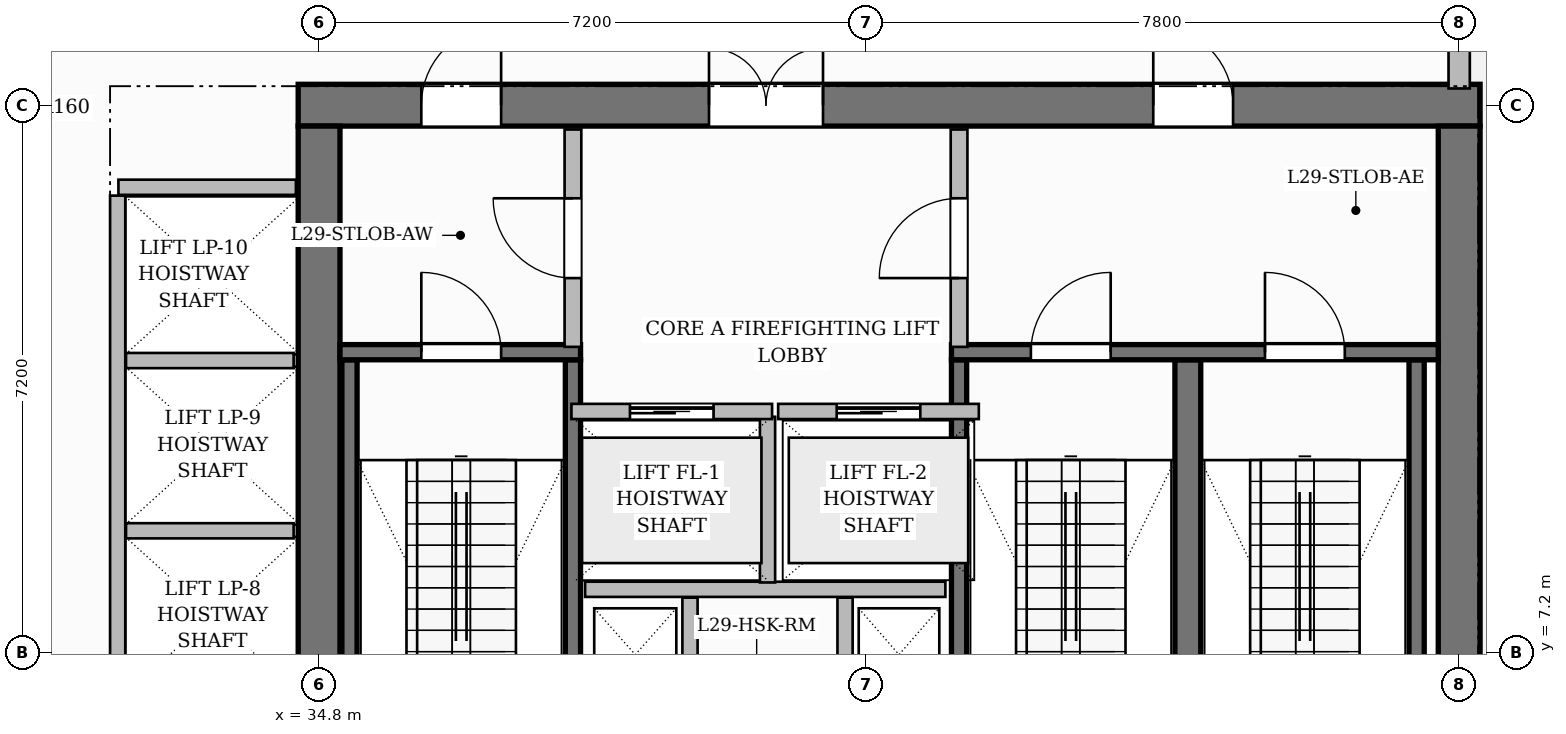
"""IFC4 building model, lengths in metres.
Left out: names, types, materials, properties, quantities, classifications, styles, units other than length and angle.
Written with IfcOpenShell. Run it as: python <this file> out.ifc"""

import sys

from ifc_helpers import new_model, si_unit, direction, frame, frame_2d, origin, place, context, subcontext, project, spatial, rectangle, extrude, source, transform, mapped, element, fill, save


model = new_model("IFC4")
c1 = context("Model", 3, precision=1e-05, world=origin(), true_north=direction((0.0, 1.0)))
c2 = subcontext(c1, "Body", "Model", "MODEL_VIEW")
j1 = project(units=[si_unit("LENGTHUNIT", "METRE"), si_unit("PLANEANGLEUNIT", "RADIAN")], contexts=[c1])
p1 = place(None, origin())
s1 = spatial("IfcSite", under=j1, at=p1, CompositionType="ELEMENT")
p2 = place(p1, origin())
s2 = spatial("IfcBuilding", under=s1, at=p2, CompositionType="ELEMENT")
p3 = place(p2, frame((0.0, 0.0, 119.2)))
s3 = spatial("IfcBuildingStorey", under=s2, at=p3, CompositionType="ELEMENT", Elevation=119.2)
p4 = place(p3, frame((34.525, 14.4, 0.0), z_axis=(0.0, 0.0, 1.0), x_axis=(1.0, 0.0, 0.0)))
e1 = element("IfcWall", 1, at=p4, inside=s3, PredefinedType="SHEAR", context=c2, shape_type="SweptSolid", body=[
    extrude(rectangle(XDim=15.55, YDim=0.55, at=frame_2d((7.775, 0.0))), origin(), (0.0, 0.0, 1.0), 3.7),
])
p5 = place(p4, frame((5.405, 0.0, 0.0)))
e2 = element("IfcOpeningElement", 2, at=p5, cuts=e1, PredefinedType="OPENING", context=c2, shape_type="SweptSolid", body=[
    extrude(rectangle(XDim=1.5, YDim=2.2, at=frame_2d((0.75, 1.1))), frame((0.0, 0.285, 0.0), z_axis=(0.0, -1.0, 0.0), x_axis=(1.0, 0.0, 0.0)), (0.0, 0.0, 1.0), 0.57),
])
p6 = place(p4, frame((1.62, 0.0, 0.0)))
e3 = element("IfcOpeningElement", 3, at=p6, cuts=e1, PredefinedType="OPENING", context=c2, shape_type="SweptSolid", body=[
    extrude(rectangle(XDim=1.05, YDim=2.15, at=frame_2d((0.525, 1.075))), frame((0.0, 0.285, 0.0), z_axis=(0.0, -1.0, 0.0), x_axis=(1.0, 0.0, 0.0)), (0.0, 0.0, 1.0), 0.57),
])
p7 = place(p4, frame((11.25, 0.0, 0.0)))
e4 = element("IfcOpeningElement", 4, at=p7, cuts=e1, PredefinedType="OPENING", context=c2, shape_type="SweptSolid", body=[
    extrude(rectangle(XDim=1.05, YDim=2.15, at=frame_2d((0.525, 1.075))), frame((0.0, 0.285, 0.0), z_axis=(0.0, -1.0, 0.0), x_axis=(1.0, 0.0, 0.0)), (0.0, 0.0, 1.0), 0.57),
])
for number, where, z_axis, x_axis in (
    (5, (34.8, 3.875, 0.0), (0.0, 0.0, 1.0), (0.0, 1.0, 0.0)),
    (6, (49.8, 3.875, 0.0), (0.0, 0.0, 1.0), (0.0, 1.0, 0.0)),
):
    element("IfcWall", number, at=place(p3, frame(where, z_axis=z_axis, x_axis=x_axis)), inside=s3, PredefinedType="SHEAR", context=c2, shape_type="SweptSolid", body=[
        extrude(rectangle(XDim=10.25, YDim=0.55, at=frame_2d((5.125, 0.0))), origin(), (0.0, 0.0, 1.0), 3.7),
    ])
for number, where, z_axis, x_axis in (
    (7, (35.2, 4.1, 0.0), (0.0, 0.0, 1.0), (0.0, 1.0, 0.0)),
    (8, (38.14, 4.1, 0.0), (0.0, 0.0, 1.0), (0.0, 1.0, 0.0)),
):
    element("IfcWall", number, at=place(p3, frame(where, z_axis=z_axis, x_axis=x_axis)), inside=s3, PredefinedType="SHEAR", context=c2, shape_type="SweptSolid", body=[
        extrude(rectangle(XDim=6.95, YDim=0.2, at=frame_2d((3.475, 0.0))), origin(), (0.0, 0.0, 1.0), 3.7),
    ])
p8 = place(p3, frame((35.075, 11.15, 0.0), z_axis=(0.0, 0.0, 1.0), x_axis=(1.0, 0.0, 0.0)))
e9 = element("IfcWall", 9, at=p8, inside=s3, PredefinedType="SHEAR", context=c2, shape_type="SweptSolid", body=[
    extrude(rectangle(XDim=3.165, YDim=0.2, at=frame_2d((1.583, 0.0))), origin(), (0.0, 0.0, 1.0), 3.7),
])
p9 = place(p8, frame((1.07, 0.0, 0.0)))
e10 = element("IfcOpeningElement", 10, at=p9, cuts=e9, PredefinedType="OPENING", context=c2, shape_type="SweptSolid", body=[
    extrude(rectangle(XDim=1.05, YDim=2.2, at=frame_2d((0.525, 1.1))), frame((0.0, 0.11, 0.0), z_axis=(0.0, -1.0, 0.0), x_axis=(1.0, 0.0, 0.0)), (0.0, 0.0, 1.0), 0.22),
])
p10 = place(p3, frame((43.22, 4.1, 0.0), z_axis=(0.0, 0.0, 1.0), x_axis=(0.0, 1.0, 0.0)))
e11 = element("IfcWall", 11, at=p10, inside=s3, PredefinedType="SHEAR", context=c2, shape_type="SweptSolid", body=[
    extrude(rectangle(XDim=6.95, YDim=0.2, at=frame_2d((3.475, 0.0))), origin(), (0.0, 0.0, 1.0), 3.7),
])
p11 = place(p3, frame((46.23, 4.1, 0.0), z_axis=(0.0, 0.0, 1.0), x_axis=(0.0, 1.0, 0.0)))
e12 = element("IfcWall", 12, at=p11, inside=s3, PredefinedType="SHEAR", context=c2, shape_type="SweptSolid", body=[
    extrude(rectangle(XDim=6.95, YDim=0.34, at=frame_2d((3.475, 0.0))), origin(), (0.0, 0.0, 1.0), 3.7),
])
p12 = place(p3, frame((49.24, 4.1, 0.0), z_axis=(0.0, 0.0, 1.0), x_axis=(0.0, 1.0, 0.0)))
e13 = element("IfcWall", 13, at=p12, inside=s3, PredefinedType="SHEAR", context=c2, shape_type="SweptSolid", body=[
    extrude(rectangle(XDim=6.95, YDim=0.2, at=frame_2d((3.475, 0.0))), origin(), (0.0, 0.0, 1.0), 3.7),
])
p13 = place(p3, frame((43.12, 11.15, 0.0), z_axis=(0.0, 0.0, 1.0), x_axis=(1.0, 0.0, 0.0)))
e14 = element("IfcWall", 14, at=p13, inside=s3, PredefinedType="SHEAR", context=c2, shape_type="SweptSolid", body=[
    extrude(rectangle(XDim=6.405, YDim=0.2, at=frame_2d((3.202, 0.0))), origin(), (0.0, 0.0, 1.0), 3.7),
])
p14 = place(p13, frame((1.045, 0.0, 0.0)))
e15 = element("IfcOpeningElement", 15, at=p14, cuts=e14, PredefinedType="OPENING", context=c2, shape_type="SweptSolid", body=[
    extrude(rectangle(XDim=1.05, YDim=2.2, at=frame_2d((0.525, 1.1))), frame((0.0, 0.11, 0.0), z_axis=(0.0, -1.0, 0.0), x_axis=(1.0, 0.0, 0.0)), (0.0, 0.0, 1.0), 0.22),
])
p15 = place(p13, frame((4.125, 0.0, 0.0)))
e16 = element("IfcOpeningElement", 16, at=p15, cuts=e14, PredefinedType="OPENING", context=c2, shape_type="SweptSolid", body=[
    extrude(rectangle(XDim=1.05, YDim=2.2, at=frame_2d((0.525, 1.1))), frame((0.0, 0.11, 0.0), z_axis=(0.0, -1.0, 0.0), x_axis=(1.0, 0.0, 0.0)), (0.0, 0.0, 1.0), 0.22),
])
p16 = place(p3, frame((38.3, 8.03, 0.0), z_axis=(0.0, 0.0, 1.0), x_axis=(1.0, 0.0, 0.0)))
e17 = element("IfcWall", 17, at=p16, inside=s3, PredefinedType="PARTITIONING", context=c2, shape_type="SweptSolid", body=[
    extrude(rectangle(XDim=4.74, YDim=0.2, at=frame_2d((2.37, 0.0))), origin(), (0.0, 0.0, 1.0), 3.45),
])
p17 = place(p3, frame((40.7, 8.12, 0.0), z_axis=(0.0, 0.0, 1.0), x_axis=(0.0, 1.0, 0.0)))
e18 = element("IfcWall", 18, at=p17, inside=s3, PredefinedType="PARTITIONING", context=c2, shape_type="SweptSolid", body=[
    extrude(rectangle(XDim=2.18, YDim=0.2, at=frame_2d((1.09, 0.0))), origin(), (0.0, 0.0, 1.0), 3.45),
])
p18 = place(p3, frame((38.14, 11.22, 0.0), z_axis=(0.0, 0.0, 1.0), x_axis=(0.0, 1.0, 0.0)))
e19 = element("IfcWall", 19, at=p18, inside=s3, PredefinedType="PARTITIONING", context=c2, shape_type="SweptSolid", body=[
    extrude(rectangle(XDim=2.86, YDim=0.22, at=frame_2d((1.43, 0.0))), origin(), (0.0, 0.0, 1.0), 3.45),
])
p19 = place(p18, frame((0.905, 0.0, 0.0)))
e20 = element("IfcOpeningElement", 20, at=p19, cuts=e19, PredefinedType="OPENING", context=c2, shape_type="SweptSolid", body=[
    extrude(rectangle(XDim=1.05, YDim=2.15, at=frame_2d((0.525, 1.075))), frame((0.0, 0.12, 0.0), z_axis=(0.0, -1.0, 0.0), x_axis=(1.0, 0.0, 0.0)), (0.0, 0.0, 1.0), 0.24),
])
p20 = place(p3, frame((43.22, 11.22, 0.0), z_axis=(0.0, 0.0, 1.0), x_axis=(0.0, 1.0, 0.0)))
e21 = element("IfcWall", 21, at=p20, inside=s3, PredefinedType="PARTITIONING", context=c2, shape_type="SweptSolid", body=[
    extrude(rectangle(XDim=2.86, YDim=0.22, at=frame_2d((1.43, 0.0))), origin(), (0.0, 0.0, 1.0), 3.45),
])
p21 = place(p20, frame((0.905, 0.0, 0.0)))
e22 = element("IfcOpeningElement", 22, at=p21, cuts=e21, PredefinedType="OPENING", context=c2, shape_type="SweptSolid", body=[
    extrude(rectangle(XDim=1.05, YDim=2.15, at=frame_2d((0.525, 1.075))), frame((0.0, 0.12, 0.0), z_axis=(0.0, -1.0, 0.0), x_axis=(1.0, 0.0, 0.0)), (0.0, 0.0, 1.0), 0.24),
])
for number, where, z_axis, x_axis in (
    (23, (39.68, 6.13, 0.0), (0.0, 0.0, 1.0), (0.0, 1.0, 0.0)),
    (24, (41.72, 6.13, 0.0), (0.0, 0.0, 1.0), (0.0, 1.0, 0.0)),
):
    element("IfcWall", number, at=place(p3, frame(where, z_axis=z_axis, x_axis=x_axis)), inside=s3, PredefinedType="PARTITIONING", context=c2, shape_type="SweptSolid", body=[
        extrude(rectangle(XDim=1.79, YDim=0.2, at=frame_2d((0.895, 0.0))), origin(), (0.0, 0.0, 1.0), 3.45),
    ])
p22 = place(p3, frame((32.16, 13.32, 0.0), z_axis=(0.0, 0.0, 1.0), x_axis=(1.0, 0.0, 0.0)))
e25 = element("IfcWall", 25, at=p22, inside=s3, PredefinedType="PARTITIONING", context=c2, shape_type="SweptSolid", body=[
    extrude(rectangle(XDim=2.335, YDim=0.2, at=frame_2d((1.167, 0.0))), origin(), (0.0, 0.0, 1.0), 3.45),
])
p23 = place(p3, frame((32.15, 4.39, 0.0), z_axis=(0.0, 0.0, 1.0), x_axis=(0.0, 1.0, 0.0)))
e26 = element("IfcWall", 26, at=p23, inside=s3, PredefinedType="PARTITIONING", context=c2, shape_type="SweptSolid", body=[
    extrude(rectangle(XDim=8.82, YDim=0.2, at=frame_2d((4.41, 0.0))), origin(), (0.0, 0.0, 1.0), 3.45),
])
for number, where, z_axis, x_axis in (
    (27, (32.26, 8.8, 0.0), (0.0, 0.0, 1.0), (1.0, 0.0, 0.0)),
    (28, (32.26, 11.04, 0.0), (0.0, 0.0, 1.0), (1.0, 0.0, 0.0)),
):
    element("IfcWall", number, at=place(p3, frame(where, z_axis=z_axis, x_axis=x_axis)), inside=s3, PredefinedType="PARTITIONING", context=c2, shape_type="SweptSolid", body=[
        extrude(rectangle(XDim=2.205, YDim=0.2, at=frame_2d((1.103, 0.0))), origin(), (0.0, 0.0, 1.0), 3.45),
    ])
p24 = place(p3, frame((38.12, 10.37, 0.0), z_axis=(0.0, 0.0, 1.0), x_axis=(1.0, 0.0, 0.0)))
e29 = element("IfcWall", 29, at=p24, inside=s3, PredefinedType="PARTITIONING", context=c2, shape_type="SweptSolid", body=[
    extrude(rectangle(XDim=2.64, YDim=0.2, at=frame_2d((1.32, 0.0))), origin(), (0.0, 0.0, 1.0), 3.45),
])
p25 = place(p24, frame((0.77, 0.0, 0.0)))
e30 = element("IfcOpeningElement", 30, at=p25, cuts=e29, PredefinedType="OPENING", context=c2, shape_type="SweptSolid", body=[
    extrude(rectangle(XDim=1.1, YDim=2.2, at=frame_2d((0.55, 1.1))), frame((0.0, 0.11, 0.0), z_axis=(0.0, -1.0, 0.0), x_axis=(1.0, 0.0, 0.0)), (0.0, 0.0, 1.0), 0.22),
])
p26 = place(p3, frame((40.84, 10.37, 0.0), z_axis=(0.0, 0.0, 1.0), x_axis=(1.0, 0.0, 0.0)))
e31 = element("IfcWall", 31, at=p26, inside=s3, PredefinedType="PARTITIONING", context=c2, shape_type="SweptSolid", body=[
    extrude(rectangle(XDim=2.64, YDim=0.2, at=frame_2d((1.32, 0.0))), origin(), (0.0, 0.0, 1.0), 3.45),
])
p27 = place(p26, frame((0.77, 0.0, 0.0)))
e32 = element("IfcOpeningElement", 32, at=p27, cuts=e31, PredefinedType="OPENING", context=c2, shape_type="SweptSolid", body=[
    extrude(rectangle(XDim=1.1, YDim=2.2, at=frame_2d((0.55, 1.1))), frame((0.0, 0.11, 0.0), z_axis=(0.0, -1.0, 0.0), x_axis=(1.0, 0.0, 0.0)), (0.0, 0.0, 1.0), 0.22),
])
p28 = place(p3, frame((49.8, 14.62, 0.0), z_axis=(0.0, 0.0, 1.0), x_axis=(0.0, 1.0, 0.0)))
e33 = element("IfcWall", 33, at=p28, inside=s3, PredefinedType="SOLIDWALL", context=c2, shape_type="SweptSolid", body=[
    extrude(rectangle(XDim=6.93, YDim=0.28, at=frame_2d((3.465, 0.0))), origin(), (0.0, 0.0, 1.0), 2.935),
])
p29 = place(p28, frame((1.889, 0.0, 0.0)))
e34 = element("IfcOpeningElement", 34, at=p29, cuts=e33, PredefinedType="OPENING", context=c2, shape_type="SweptSolid", body=[
    extrude(rectangle(XDim=1.2, YDim=2.2, at=frame_2d((0.6, 1.1))), frame((0.0, 0.15, 0.0), z_axis=(0.0, -1.0, 0.0), x_axis=(1.0, 0.0, 0.0)), (0.0, 0.0, 1.0), 0.3),
])
p30 = place(p28, frame((3.884, 0.0, 0.8)))
e35 = element("IfcOpeningElement", 35, at=p30, cuts=e33, PredefinedType="OPENING", context=c2, shape_type="SweptSolid", body=[
    extrude(rectangle(XDim=1.8, YDim=1.85, at=frame_2d((0.9, 0.925))), frame((0.0, 0.15, 0.0), z_axis=(0.0, -1.0, 0.0), x_axis=(1.0, 0.0, 0.0)), (0.0, 0.0, 1.0), 0.3),
])
m1 = source(origin(), c2, "Body", "SweptSolid", [
    extrude(rectangle(XDim=1.05, YDim=2.2, at=frame_2d((0.525, 1.1))), frame((0.0, 0.025, 0.0), z_axis=(0.0, -1.0, 0.0), x_axis=(1.0, 0.0, 0.0)), (0.0, 0.0, 1.0), 0.05),
])
p31 = place(p9, origin())
e36 = element("IfcDoor", 36, at=p31, inside=s3, OperationType="SINGLE_SWING_LEFT", PredefinedType="DOOR", context=c2, shape_type="MappedRepresentation", body=[
    mapped(m1, transform((0.0, 0.0, 0.0), scale=1.0)),
])
fill(e10, e36)
p32 = place(p14, origin())
e37 = element("IfcDoor", 37, at=p32, inside=s3, OperationType="SINGLE_SWING_RIGHT", PredefinedType="DOOR", context=c2, shape_type="MappedRepresentation", body=[
    mapped(m1, transform((0.0, 0.0, 0.0), scale=1.0)),
])
fill(e15, e37)
p33 = place(p15, origin())
e38 = element("IfcDoor", 38, at=p33, inside=s3, OperationType="SINGLE_SWING_LEFT", PredefinedType="DOOR", context=c2, shape_type="MappedRepresentation", body=[
    mapped(m1, transform((0.0, 0.0, 0.0), scale=1.0)),
])
fill(e16, e38)
m2 = source(origin(), c2, "Body", "SweptSolid", [
    extrude(rectangle(XDim=1.05, YDim=2.15, at=frame_2d((0.525, 1.075))), frame((0.0, 0.025, 0.0), z_axis=(0.0, -1.0, 0.0), x_axis=(1.0, 0.0, 0.0)), (0.0, 0.0, 1.0), 0.05),
])
p34 = place(p19, origin())
e39 = element("IfcDoor", 39, at=p34, inside=s3, OperationType="SINGLE_SWING_RIGHT", PredefinedType="DOOR", context=c2, shape_type="MappedRepresentation", body=[
    mapped(m2, transform((0.0, 0.0, 0.0), scale=1.0)),
])
fill(e20, e39)
p35 = place(p21, origin())
e40 = element("IfcDoor", 40, at=p35, inside=s3, OperationType="SINGLE_SWING_LEFT", PredefinedType="DOOR", context=c2, shape_type="MappedRepresentation", body=[
    mapped(m2, transform((0.0, 0.0, 0.0), scale=1.0)),
])
fill(e22, e40)
m3 = source(origin(), c2, "Body", "SweptSolid", [
    extrude(rectangle(XDim=1.5, YDim=2.2, at=frame_2d((0.75, 1.1))), frame((0.0, 0.025, 0.0), z_axis=(0.0, -1.0, 0.0), x_axis=(1.0, 0.0, 0.0)), (0.0, 0.0, 1.0), 0.05),
])
p36 = place(p5, origin())
e41 = element("IfcDoor", 41, at=p36, inside=s3, OperationType="DOUBLE_DOOR_SINGLE_SWING", PredefinedType="DOOR", context=c2, shape_type="MappedRepresentation", body=[
    mapped(m3, transform((0.0, 0.0, 0.0), scale=1.0)),
])
fill(e2, e41)
p37 = place(p6, origin())
e42 = element("IfcDoor", 42, at=p37, inside=s3, OperationType="SINGLE_SWING_RIGHT", PredefinedType="DOOR", context=c2, shape_type="MappedRepresentation", body=[
    mapped(m2, transform((0.0, 0.0, 0.0), scale=1.0)),
])
fill(e3, e42)
p38 = place(p7, origin())
e43 = element("IfcDoor", 43, at=p38, inside=s3, OperationType="SINGLE_SWING_LEFT", PredefinedType="DOOR", context=c2, shape_type="MappedRepresentation", body=[
    mapped(m2, transform((0.0, 0.0, 0.0), scale=1.0)),
])
fill(e4, e43)
m4 = source(origin(), c2, "Body", "SweptSolid", [
    extrude(rectangle(XDim=1.1, YDim=2.2, at=frame_2d((0.55, 1.1))), frame((0.0, 0.025, 0.0), z_axis=(0.0, -1.0, 0.0), x_axis=(1.0, 0.0, 0.0)), (0.0, 0.0, 1.0), 0.05),
])
p39 = place(p25, origin())
e44 = element("IfcDoor", 44, at=p39, inside=s3, OperationType="SLIDING_TO_LEFT", PredefinedType="DOOR", context=c2, shape_type="MappedRepresentation", body=[
    mapped(m4, transform((0.0, 0.0, 0.0), scale=1.0)),
])
fill(e30, e44)
p40 = place(p27, origin())
e45 = element("IfcDoor", 45, at=p40, inside=s3, OperationType="SLIDING_TO_LEFT", PredefinedType="DOOR", context=c2, shape_type="MappedRepresentation", body=[
    mapped(m4, transform((0.0, 0.0, 0.0), scale=1.0)),
])
fill(e32, e45)
save(model, sys.argv[1])
